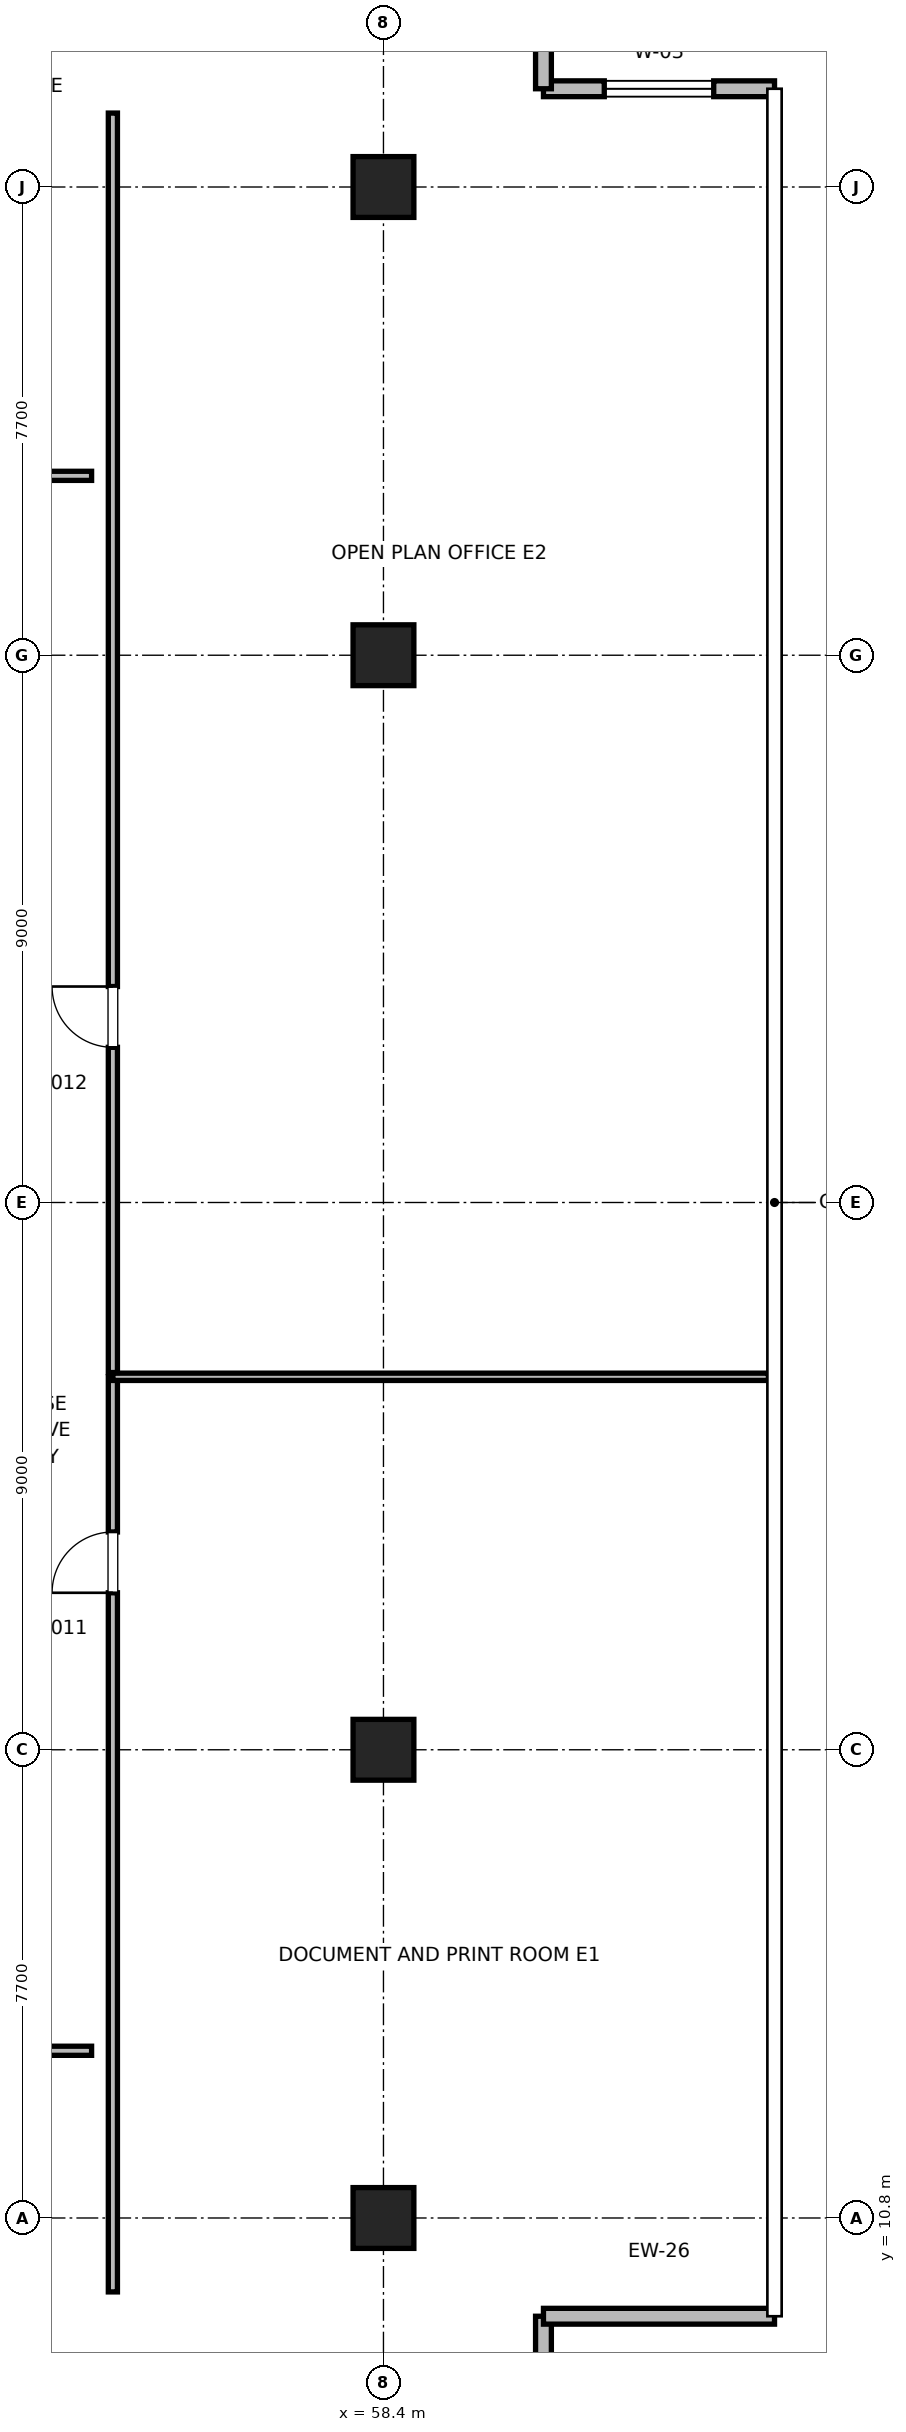
"""IFC4 building model, lengths in metres.
Left out: names, types, materials, properties, quantities, classifications, styles, units other than length and angle.
Written with IfcOpenShell. Run it as: python <this file> out.ifc"""

import sys

from ifc_helpers import new_model, si_unit, direction, frame, frame_2d, origin, origin_2d, place, context, subcontext, project, spatial, rectangle, extrude, element, fill, save


model = new_model("IFC4")
c1 = context("Model", 3, precision=1e-05, world=origin(), true_north=direction((0.0, 1.0)))
c2 = subcontext(c1, "Body", "Model", "MODEL_VIEW")
j1 = project(units=[si_unit("LENGTHUNIT", "METRE"), si_unit("PLANEANGLEUNIT", "RADIAN")], contexts=[c1])
p1 = place(None, origin())
s1 = spatial("IfcSite", under=j1, at=p1, CompositionType="ELEMENT")
p2 = place(p1, origin())
s2 = spatial("IfcBuilding", under=s1, at=p2, CompositionType="ELEMENT")
p3 = place(p2, frame((0.0, 0.0, 326.8)))
s3 = spatial("IfcBuildingStorey", under=s2, at=p3, CompositionType="ELEMENT", Elevation=326.8)
for number, where, z_axis, x_axis in (
    (1, (58.4, 18.5, 0.0), (0.0, 0.0, 1.0), (1.0, 0.0, 0.0)),
    (2, (58.4, 36.5, 0.0), (0.0, 0.0, 1.0), (1.0, 0.0, 0.0)),
    (3, (58.4, 10.8, 0.0), (0.0, 0.0, 1.0), (1.0, 0.0, 0.0)),
    (4, (58.4, 44.2, 0.0), (0.0, 0.0, 1.0), (1.0, 0.0, 0.0)),
):
    element("IfcColumn", number, at=place(p3, frame(where, z_axis=z_axis, x_axis=x_axis)), inside=s3, PredefinedType="COLUMN", context=c2, shape_type="SweptSolid", body=[
        extrude(rectangle(XDim=1.0, YDim=1.0, at=origin_2d()), origin(), (0.0, 0.0, 1.0), 4.0),
    ])
p4 = place(p3, frame((61.031, 5.884, 0.0), z_axis=(0.0, 0.0, 1.0), x_axis=(0.0, 1.0, 0.0)))
e5 = element("IfcWall", 5, at=p4, inside=s3, PredefinedType="PARAPET", context=c2, shape_type="SweptSolid", body=[
    extrude(rectangle(XDim=3.3, YDim=0.26, at=frame_2d((1.65, 0.0))), origin(), (0.0, 0.0, 1.0), 3.785),
])
p5 = place(p4, frame((0.75, 0.0, 0.85)))
e6 = element("IfcOpeningElement", 6, at=p5, cuts=e5, PredefinedType="OPENING", context=c2, shape_type="SweptSolid", body=[
    extrude(rectangle(XDim=1.8, YDim=2.2, at=frame_2d((0.9, 1.1))), frame((0.0, 0.13, 0.0), z_axis=(0.0, -1.0, 0.0), x_axis=(1.0, 0.0, 0.0)), (0.0, 0.0, 1.0), 0.26),
])
p6 = place(p3, frame((61.031, 9.184, 0.0), z_axis=(0.0, 0.0, 1.0), x_axis=(1.0, 0.0, 0.0)))
e7 = element("IfcWall", 7, at=p6, inside=s3, PredefinedType="PARAPET", context=c2, shape_type="SweptSolid", body=[
    extrude(rectangle(XDim=3.8, YDim=0.26, at=frame_2d((1.9, 0.0))), origin(), (0.0, 0.0, 1.0), 3.785),
])
p7 = place(p3, frame((64.832, 45.816, 0.0), z_axis=(0.0, 0.0, 1.0), x_axis=(-1.0, 0.0, 0.0)))
e8 = element("IfcWall", 8, at=p7, inside=s3, PredefinedType="PARAPET", context=c2, shape_type="SweptSolid", body=[
    extrude(rectangle(XDim=3.8, YDim=0.26, at=frame_2d((1.9, 0.0))), origin(), (0.0, 0.0, 1.0), 3.785),
])
p8 = place(p7, frame((1.0, 0.0, 0.85)))
e9 = element("IfcOpeningElement", 9, at=p8, cuts=e8, PredefinedType="OPENING", context=c2, shape_type="SweptSolid", body=[
    extrude(rectangle(XDim=1.8, YDim=2.2, at=frame_2d((0.9, 1.1))), frame((0.0, 0.13, 0.0), z_axis=(0.0, -1.0, 0.0), x_axis=(1.0, 0.0, 0.0)), (0.0, 0.0, 1.0), 0.26),
])
p9 = place(p3, frame((61.031, 45.816, 0.0), z_axis=(0.0, 0.0, 1.0), x_axis=(0.0, 1.0, 0.0)))
e10 = element("IfcWall", 10, at=p9, inside=s3, PredefinedType="PARAPET", context=c2, shape_type="SweptSolid", body=[
    extrude(rectangle(XDim=3.3, YDim=0.26, at=frame_2d((1.65, 0.0))), origin(), (0.0, 0.0, 1.0), 3.785),
])
p10 = place(p3, frame((49.59, 39.45, 0.0), z_axis=(0.0, 0.0, 1.0), x_axis=(1.0, 0.0, 0.0)))
e11 = element("IfcWall", 11, at=p10, inside=s3, PredefinedType="PARTITIONING", context=c2, shape_type="SweptSolid", body=[
    extrude(rectangle(XDim=4.01, YDim=0.15, at=frame_2d((2.005, 0.0))), origin(), (0.0, 0.0, 1.0), 2.85),
])
p11 = place(p10, frame((1.455, 0.0, 0.0)))
e12 = element("IfcOpeningElement", 12, at=p11, cuts=e11, PredefinedType="OPENING", context=c2, shape_type="SweptSolid", body=[
    extrude(rectangle(XDim=1.0, YDim=2.15, at=frame_2d((0.5, 1.075))), frame((0.0, 0.075, 0.0), z_axis=(0.0, -1.0, 0.0), x_axis=(1.0, 0.0, 0.0)), (0.0, 0.0, 1.0), 0.15),
])
p12 = place(p3, frame((44.694, 13.55, 0.0), z_axis=(0.0, 0.0, 1.0), x_axis=(1.0, 0.0, 0.0)))
e13 = element("IfcWall", 13, at=p12, inside=s3, PredefinedType="PARTITIONING", context=c2, shape_type="SweptSolid", body=[
    extrude(rectangle(XDim=8.906, YDim=0.15, at=frame_2d((4.453, 0.0))), origin(), (0.0, 0.0, 1.0), 2.85),
])
p13 = place(p12, frame((3.903, 0.0, 0.0)))
e14 = element("IfcOpeningElement", 14, at=p13, cuts=e13, PredefinedType="OPENING", context=c2, shape_type="SweptSolid", body=[
    extrude(rectangle(XDim=1.0, YDim=2.15, at=frame_2d((0.5, 1.075))), frame((0.0, 0.075, 0.0), z_axis=(0.0, -1.0, 0.0), x_axis=(1.0, 0.0, 0.0)), (0.0, 0.0, 1.0), 0.15),
])
p14 = place(p3, frame((53.95, 9.584, 0.0), z_axis=(0.0, 0.0, 1.0), x_axis=(0.0, 1.0, 0.0)))
e15 = element("IfcWall", 15, at=p14, inside=s3, PredefinedType="PARTITIONING", context=c2, shape_type="SweptSolid", body=[
    extrude(rectangle(XDim=15.049, YDim=0.15, at=frame_2d((7.525, 0.0))), origin(), (0.0, 0.0, 1.0), 2.85),
])
p15 = place(p14, frame((11.497, 0.0, 0.0)))
e16 = element("IfcOpeningElement", 16, at=p15, cuts=e15, PredefinedType="OPENING", context=c2, shape_type="SweptSolid", body=[
    extrude(rectangle(XDim=1.0, YDim=2.15, at=frame_2d((0.5, 1.075))), frame((0.0, 0.075, 0.0), z_axis=(0.0, -1.0, 0.0), x_axis=(1.0, 0.0, 0.0)), (0.0, 0.0, 1.0), 0.15),
])
p16 = place(p3, frame((53.95, 24.634, 0.0), z_axis=(0.0, 0.0, 1.0), x_axis=(1.0, 0.0, 0.0)))
e17 = element("IfcWall", 17, at=p16, inside=s3, PredefinedType="PARTITIONING", context=c2, shape_type="SweptSolid", body=[
    extrude(rectangle(XDim=10.781, YDim=0.12, at=frame_2d((5.391, 0.0))), origin(), (0.0, 0.0, 1.0), 2.85),
])
p17 = place(p3, frame((53.95, 24.704, 0.0), z_axis=(0.0, 0.0, 1.0), x_axis=(0.0, 1.0, 0.0)))
e18 = element("IfcWall", 18, at=p17, inside=s3, PredefinedType="PARTITIONING", context=c2, shape_type="SweptSolid", body=[
    extrude(rectangle(XDim=20.712, YDim=0.15, at=frame_2d((10.356, 0.0))), origin(), (0.0, 0.0, 1.0), 2.85),
])
p18 = place(p17, frame((5.348, 0.0, 0.0)))
e19 = element("IfcOpeningElement", 19, at=p18, cuts=e18, PredefinedType="OPENING", context=c2, shape_type="SweptSolid", body=[
    extrude(rectangle(XDim=1.0, YDim=2.15, at=frame_2d((0.5, 1.075))), frame((0.0, 0.075, 0.0), z_axis=(0.0, -1.0, 0.0), x_axis=(1.0, 0.0, 0.0)), (0.0, 0.0, 1.0), 0.15),
])
p19 = place(p8, origin())
e20 = element("IfcWindow", 20, at=p19, inside=s3, PartitioningType="SINGLE_PANEL", PredefinedType="WINDOW", context=c2, shape_type="SweptSolid", body=[
    extrude(rectangle(XDim=1.8, YDim=2.2, at=frame_2d((0.9, 1.1))), frame((0.0, 0.03, 0.0), z_axis=(0.0, -1.0, 0.0), x_axis=(1.0, 0.0, 0.0)), (0.0, 0.0, 1.0), 0.06),
])
fill(e9, e20)
p20 = place(p15, origin())
e21 = element("IfcDoor", 21, at=p20, inside=s3, OperationType="SINGLE_SWING_LEFT", PredefinedType="DOOR", context=c2, shape_type="SweptSolid", body=[
    extrude(rectangle(XDim=1.0, YDim=2.15, at=frame_2d((0.5, 1.075))), frame((0.0, 0.025, 0.0), z_axis=(0.0, -1.0, 0.0), x_axis=(1.0, 0.0, 0.0)), (0.0, 0.0, 1.0), 0.05),
])
fill(e16, e21)
p21 = place(p18, origin())
e22 = element("IfcDoor", 22, at=p21, inside=s3, OperationType="SINGLE_SWING_RIGHT", PredefinedType="DOOR", context=c2, shape_type="SweptSolid", body=[
    extrude(rectangle(XDim=1.0, YDim=2.15, at=frame_2d((0.5, 1.075))), frame((0.0, 0.025, 0.0), z_axis=(0.0, -1.0, 0.0), x_axis=(1.0, 0.0, 0.0)), (0.0, 0.0, 1.0), 0.05),
])
fill(e19, e22)
save(model, sys.argv[1])
